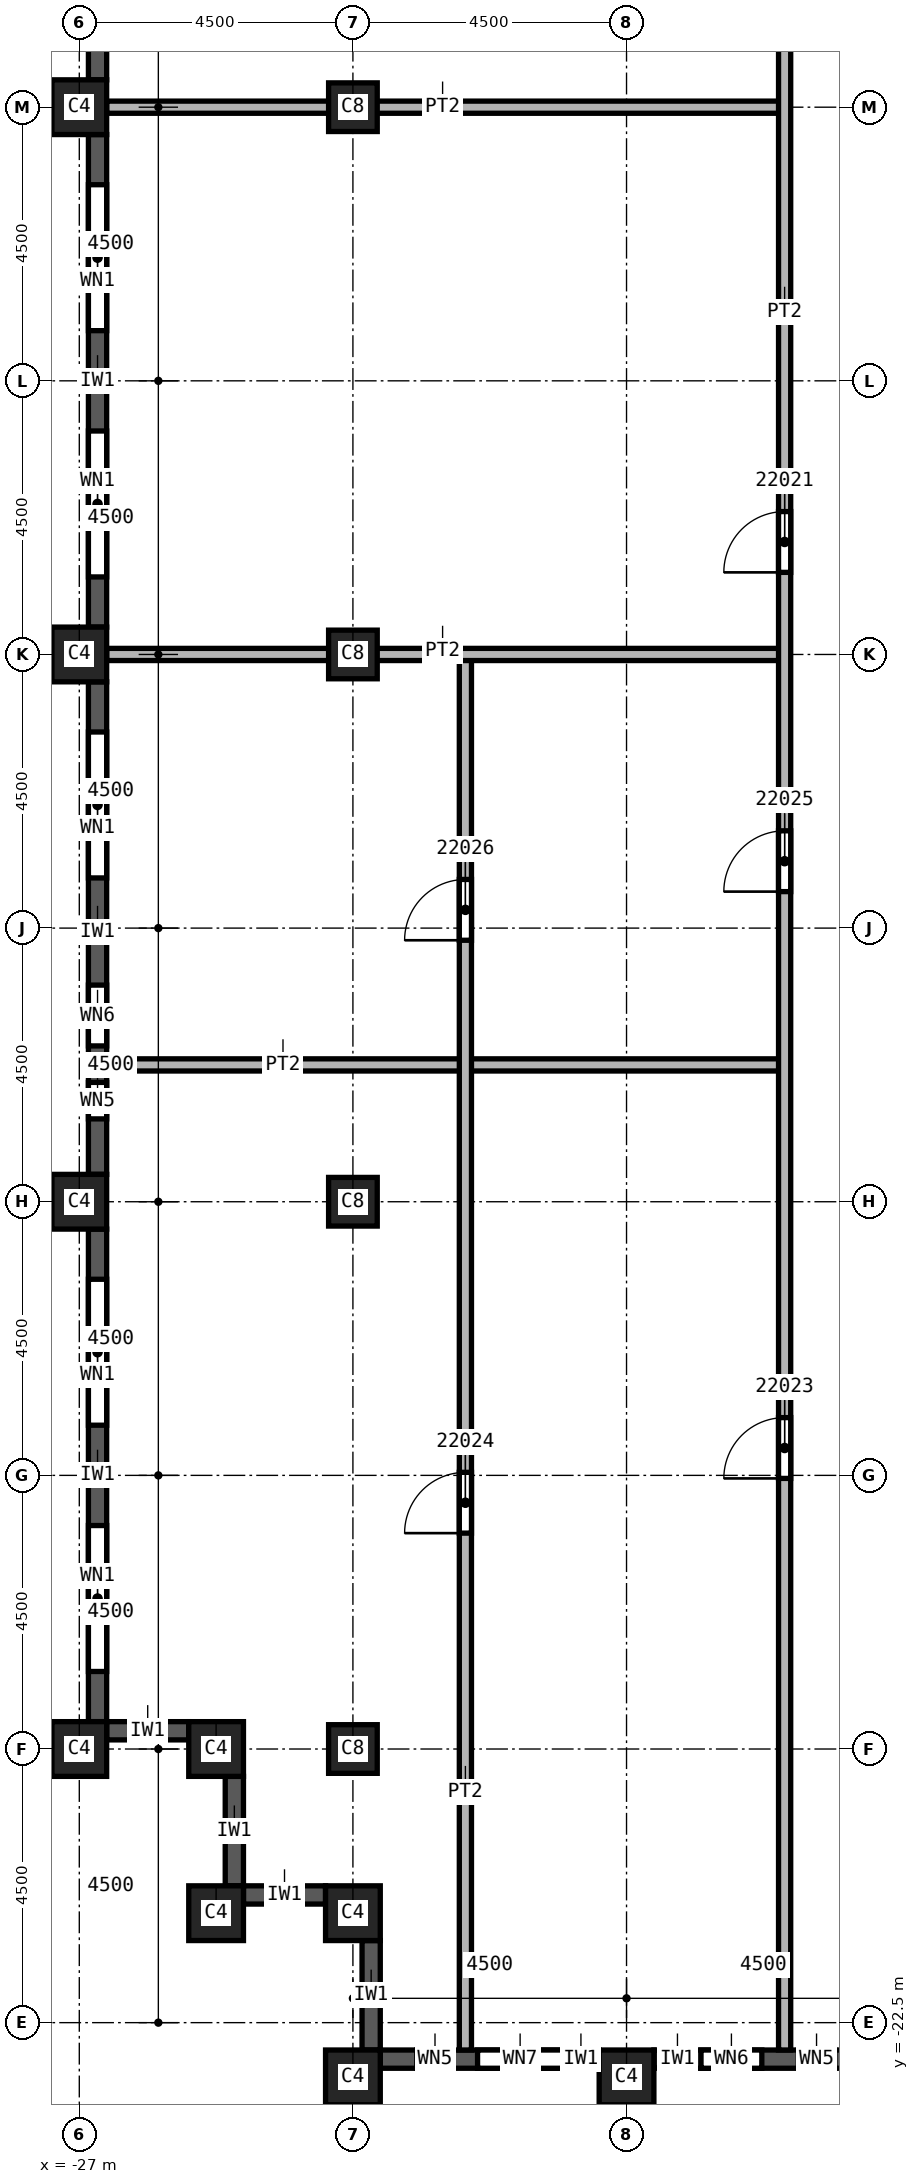
"""IFC4 building model, lengths in metres.
Left out: names, types, materials, properties, quantities, classifications, styles, units other than length and angle.
Written with IfcOpenShell. Run it as: python <this file> out.ifc"""

import sys

from ifc_helpers import new_model, si_unit, direction, frame, frame_2d, origin, origin_2d, place, context, subcontext, project, spatial, rectangle, extrude, element, fill, save


model = new_model("IFC4")
c1 = context("Model", 3, precision=1e-05, world=origin(), true_north=direction((0.0, 1.0)))
c2 = subcontext(c1, "Body", "Model", "MODEL_VIEW")
j1 = project(units=[si_unit("LENGTHUNIT", "METRE"), si_unit("PLANEANGLEUNIT", "RADIAN")], contexts=[c1])
p1 = place(None, origin())
s1 = spatial("IfcSite", under=j1, at=p1, CompositionType="ELEMENT")
p2 = place(p1, origin())
s2 = spatial("IfcBuilding", under=s1, at=p2, CompositionType="ELEMENT")
p3 = place(p2, frame((0.0, 0.0, 316.0)))
s3 = spatial("IfcBuildingStorey", under=s2, at=p3, CompositionType="ELEMENT", Elevation=316.0)
for number, where, z_axis, x_axis in (
    (1, (-22.5, 0.0, 0.0), (0.0, 0.0, 1.0), (1.0, 0.0, 0.0)),
    (2, (-22.5, 9.0, 0.0), (0.0, 0.0, 1.0), (1.0, 0.0, 0.0)),
    (3, (-22.5, -9.0, 0.0), (0.0, 0.0, 1.0), (1.0, 0.0, 0.0)),
    (4, (-22.5, -18.0, 0.0), (0.0, 0.0, 1.0), (1.0, 0.0, 0.0)),
):
    element("IfcColumn", number, at=place(p3, frame(where, z_axis=z_axis, x_axis=x_axis)), inside=s3, PredefinedType="COLUMN", context=c2, shape_type="SweptSolid", body=[
        extrude(rectangle(XDim=0.8, YDim=0.8, at=origin_2d()), origin(), (0.0, 0.0, 1.0), 3.59),
    ])
for number, where, z_axis, x_axis in (
    (5, (-18.0, -23.4, 0.0), (0.0, 0.0, 1.0), (1.0, 0.0, 0.0)),
    (6, (-22.5, -23.4, 0.0), (0.0, 0.0, 1.0), (1.0, 0.0, 0.0)),
    (7, (-27.0, 0.0, 0.0), (0.0, 0.0, 1.0), (0.0, 1.0, 0.0)),
    (8, (-27.0, 9.0, 0.0), (0.0, 0.0, 1.0), (0.0, 1.0, 0.0)),
    (9, (-27.0, -9.0, 0.0), (0.0, 0.0, 1.0), (0.0, 1.0, 0.0)),
    (10, (-27.0, -18.0, 0.0), (0.0, 0.0, 1.0), (0.0, 1.0, 0.0)),
    (11, (-22.5, -20.7, 0.0), (0.0, 0.0, 1.0), (1.0, 0.0, 0.0)),
    (12, (-24.75, -20.7, 0.0), (0.0, 0.0, 1.0), (1.0, 0.0, 0.0)),
    (13, (-24.75, -18.0, 0.0), (0.0, 0.0, 1.0), (1.0, 0.0, 0.0)),
):
    element("IfcColumn", number, at=place(p3, frame(where, z_axis=z_axis, x_axis=x_axis)), inside=s3, PredefinedType="COLUMN", context=c2, shape_type="SweptSolid", body=[
        extrude(rectangle(XDim=0.9, YDim=0.9, at=origin_2d()), origin(), (0.0, 0.0, 1.0), 3.59),
    ])
p4 = place(p3, frame((-26.7, 17.55, 0.0), z_axis=(0.0, 0.0, 1.0), x_axis=(0.0, -1.0, 0.0)))
e14 = element("IfcWall", 14, at=p4, inside=s3, PredefinedType="SOLIDWALL", context=c2, shape_type="SweptSolid", body=[
    extrude(rectangle(XDim=8.1, YDim=0.3, at=frame_2d((4.05, 0.0))), origin(), (0.0, 0.0, 1.0), 2.99),
])
p5 = place(p4, frame((0.825, 0.0, 0.8)))
e15 = element("IfcOpeningElement", 15, at=p5, cuts=e14, PredefinedType="OPENING", context=c2, shape_type="SweptSolid", body=[
    extrude(rectangle(XDim=2.4, YDim=1.95, at=frame_2d((1.2, 0.975))), frame((0.0, 0.15, 0.0), z_axis=(0.0, -1.0, 0.0), x_axis=(1.0, 0.0, 0.0)), (0.0, 0.0, 1.0), 0.3),
])
p6 = place(p4, frame((4.875, 0.0, 0.8)))
e16 = element("IfcOpeningElement", 16, at=p6, cuts=e14, PredefinedType="OPENING", context=c2, shape_type="SweptSolid", body=[
    extrude(rectangle(XDim=2.4, YDim=1.95, at=frame_2d((1.2, 0.975))), frame((0.0, 0.15, 0.0), z_axis=(0.0, -1.0, 0.0), x_axis=(1.0, 0.0, 0.0)), (0.0, 0.0, 1.0), 0.3),
])
p7 = place(p3, frame((-26.7, 8.55, 0.0), z_axis=(0.0, 0.0, 1.0), x_axis=(0.0, -1.0, 0.0)))
e17 = element("IfcWall", 17, at=p7, inside=s3, PredefinedType="SOLIDWALL", context=c2, shape_type="SweptSolid", body=[
    extrude(rectangle(XDim=8.1, YDim=0.3, at=frame_2d((4.05, 0.0))), origin(), (0.0, 0.0, 1.0), 2.99),
])
p8 = place(p7, frame((0.825, 0.0, 0.8)))
e18 = element("IfcOpeningElement", 18, at=p8, cuts=e17, PredefinedType="OPENING", context=c2, shape_type="SweptSolid", body=[
    extrude(rectangle(XDim=2.4, YDim=1.95, at=frame_2d((1.2, 0.975))), frame((0.0, 0.15, 0.0), z_axis=(0.0, -1.0, 0.0), x_axis=(1.0, 0.0, 0.0)), (0.0, 0.0, 1.0), 0.3),
])
p9 = place(p7, frame((4.875, 0.0, 0.8)))
e19 = element("IfcOpeningElement", 19, at=p9, cuts=e17, PredefinedType="OPENING", context=c2, shape_type="SweptSolid", body=[
    extrude(rectangle(XDim=2.4, YDim=1.95, at=frame_2d((1.2, 0.975))), frame((0.0, 0.15, 0.0), z_axis=(0.0, -1.0, 0.0), x_axis=(1.0, 0.0, 0.0)), (0.0, 0.0, 1.0), 0.3),
])
p10 = place(p3, frame((-26.7, -0.45, 0.0), z_axis=(0.0, 0.0, 1.0), x_axis=(0.0, -1.0, 0.0)))
e20 = element("IfcWall", 20, at=p10, inside=s3, PredefinedType="SOLIDWALL", context=c2, shape_type="SweptSolid", body=[
    extrude(rectangle(XDim=8.1, YDim=0.3, at=frame_2d((4.05, 0.0))), origin(), (0.0, 0.0, 1.0), 2.99),
])
p11 = place(p10, frame((0.825, 0.0, 0.8)))
e21 = element("IfcOpeningElement", 21, at=p11, cuts=e20, PredefinedType="OPENING", context=c2, shape_type="SweptSolid", body=[
    extrude(rectangle(XDim=2.4, YDim=1.95, at=frame_2d((1.2, 0.975))), frame((0.0, 0.15, 0.0), z_axis=(0.0, -1.0, 0.0), x_axis=(1.0, 0.0, 0.0)), (0.0, 0.0, 1.0), 0.3),
])
p12 = place(p10, frame((4.988, 0.0, 0.8)))
e22 = element("IfcOpeningElement", 22, at=p12, cuts=e20, PredefinedType="OPENING", context=c2, shape_type="SweptSolid", body=[
    extrude(rectangle(XDim=1.0, YDim=1.95, at=frame_2d((0.5, 0.975))), frame((0.0, 0.15, 0.0), z_axis=(0.0, -1.0, 0.0), x_axis=(1.0, 0.0, 0.0)), (0.0, 0.0, 1.0), 0.3),
])
p13 = place(p10, frame((6.587, 0.0, 0.8)))
e23 = element("IfcOpeningElement", 23, at=p13, cuts=e20, PredefinedType="OPENING", context=c2, shape_type="SweptSolid", body=[
    extrude(rectangle(XDim=0.6, YDim=1.95, at=frame_2d((0.3, 0.975))), frame((0.0, 0.15, 0.0), z_axis=(0.0, -1.0, 0.0), x_axis=(1.0, 0.0, 0.0)), (0.0, 0.0, 1.0), 0.3),
])
p14 = place(p3, frame((-26.7, -9.45, 0.0), z_axis=(0.0, 0.0, 1.0), x_axis=(0.0, -1.0, 0.0)))
e24 = element("IfcWall", 24, at=p14, inside=s3, PredefinedType="SOLIDWALL", context=c2, shape_type="SweptSolid", body=[
    extrude(rectangle(XDim=8.1, YDim=0.3, at=frame_2d((4.05, 0.0))), origin(), (0.0, 0.0, 1.0), 2.99),
])
p15 = place(p14, frame((0.825, 0.0, 0.8)))
e25 = element("IfcOpeningElement", 25, at=p15, cuts=e24, PredefinedType="OPENING", context=c2, shape_type="SweptSolid", body=[
    extrude(rectangle(XDim=2.4, YDim=1.95, at=frame_2d((1.2, 0.975))), frame((0.0, 0.15, 0.0), z_axis=(0.0, -1.0, 0.0), x_axis=(1.0, 0.0, 0.0)), (0.0, 0.0, 1.0), 0.3),
])
p16 = place(p14, frame((4.875, 0.0, 0.8)))
e26 = element("IfcOpeningElement", 26, at=p16, cuts=e24, PredefinedType="OPENING", context=c2, shape_type="SweptSolid", body=[
    extrude(rectangle(XDim=2.4, YDim=1.95, at=frame_2d((1.2, 0.975))), frame((0.0, 0.15, 0.0), z_axis=(0.0, -1.0, 0.0), x_axis=(1.0, 0.0, 0.0)), (0.0, 0.0, 1.0), 0.3),
])
p17 = place(p3, frame((-26.55, -17.7, 0.0), z_axis=(0.0, 0.0, 1.0), x_axis=(1.0, 0.0, 0.0)))
e27 = element("IfcWall", 27, at=p17, inside=s3, PredefinedType="SOLIDWALL", context=c2, shape_type="SweptSolid", body=[
    extrude(rectangle(XDim=1.35, YDim=0.3, at=frame_2d((0.675, 0.0))), origin(), (0.0, 0.0, 1.0), 2.99),
])
p18 = place(p3, frame((-24.45, -18.45, 0.0), z_axis=(0.0, 0.0, 1.0), x_axis=(0.0, -1.0, 0.0)))
e28 = element("IfcWall", 28, at=p18, inside=s3, PredefinedType="SOLIDWALL", context=c2, shape_type="SweptSolid", body=[
    extrude(rectangle(XDim=1.8, YDim=0.3, at=frame_2d((0.9, 0.0))), origin(), (0.0, 0.0, 1.0), 2.99),
])
p19 = place(p3, frame((-24.3, -20.4, 0.0), z_axis=(0.0, 0.0, 1.0), x_axis=(1.0, 0.0, 0.0)))
e29 = element("IfcWall", 29, at=p19, inside=s3, PredefinedType="SOLIDWALL", context=c2, shape_type="SweptSolid", body=[
    extrude(rectangle(XDim=1.35, YDim=0.3, at=frame_2d((0.675, 0.0))), origin(), (0.0, 0.0, 1.0), 2.99),
])
p20 = place(p3, frame((-22.2, -21.15, 0.0), z_axis=(0.0, 0.0, 1.0), x_axis=(0.0, -1.0, 0.0)))
e30 = element("IfcWall", 30, at=p20, inside=s3, PredefinedType="SOLIDWALL", context=c2, shape_type="SweptSolid", body=[
    extrude(rectangle(XDim=1.8, YDim=0.3, at=frame_2d((0.9, 0.0))), origin(), (0.0, 0.0, 1.0), 2.99),
])
p21 = place(p3, frame((-22.05, -23.1, 0.0), z_axis=(0.0, 0.0, 1.0), x_axis=(1.0, 0.0, 0.0)))
e31 = element("IfcWall", 31, at=p21, inside=s3, PredefinedType="SOLIDWALL", context=c2, shape_type="SweptSolid", body=[
    extrude(rectangle(XDim=3.6, YDim=0.3, at=frame_2d((1.8, 0.0))), origin(), (0.0, 0.0, 1.0), 2.99),
])
p22 = place(p21, frame((0.6, 0.0, 0.8)))
e32 = element("IfcOpeningElement", 32, at=p22, cuts=e31, PredefinedType="OPENING", context=c2, shape_type="SweptSolid", body=[
    extrude(rectangle(XDim=0.6, YDim=1.95, at=frame_2d((0.3, 0.975))), frame((0.0, 0.15, 0.0), z_axis=(0.0, -1.0, 0.0), x_axis=(1.0, 0.0, 0.0)), (0.0, 0.0, 1.0), 0.3),
])
p23 = place(p21, frame((1.6, 0.0, 0.8)))
e33 = element("IfcOpeningElement", 33, at=p23, cuts=e31, PredefinedType="OPENING", context=c2, shape_type="SweptSolid", body=[
    extrude(rectangle(XDim=1.4, YDim=1.95, at=frame_2d((0.7, 0.975))), frame((0.0, 0.15, 0.0), z_axis=(0.0, -1.0, 0.0), x_axis=(1.0, 0.0, 0.0)), (0.0, 0.0, 1.0), 0.3),
])
p24 = place(p3, frame((-17.55, -23.1, 0.0), z_axis=(0.0, 0.0, 1.0), x_axis=(1.0, 0.0, 0.0)))
e34 = element("IfcWall", 34, at=p24, inside=s3, PredefinedType="SOLIDWALL", context=c2, shape_type="SweptSolid", body=[
    extrude(rectangle(XDim=3.6, YDim=0.3, at=frame_2d((1.8, 0.0))), origin(), (0.0, 0.0, 1.0), 2.99),
])
p25 = place(p24, frame((0.775, 0.0, 0.8)))
e35 = element("IfcOpeningElement", 35, at=p25, cuts=e34, PredefinedType="OPENING", context=c2, shape_type="SweptSolid", body=[
    extrude(rectangle(XDim=1.0, YDim=1.95, at=frame_2d((0.5, 0.975))), frame((0.0, 0.15, 0.0), z_axis=(0.0, -1.0, 0.0), x_axis=(1.0, 0.0, 0.0)), (0.0, 0.0, 1.0), 0.3),
])
p26 = place(p24, frame((2.375, 0.0, 0.8)))
e36 = element("IfcOpeningElement", 36, at=p26, cuts=e34, PredefinedType="OPENING", context=c2, shape_type="SweptSolid", body=[
    extrude(rectangle(XDim=0.6, YDim=1.95, at=frame_2d((0.3, 0.975))), frame((0.0, 0.15, 0.0), z_axis=(0.0, -1.0, 0.0), x_axis=(1.0, 0.0, 0.0)), (0.0, 0.0, 1.0), 0.3),
])
for number, where, z_axis, x_axis in (
    (37, (-26.55, -6.75, 0.0), (0.0, 0.0, 1.0), (1.0, 0.0, 0.0)),
    (38, (-26.55, 9.0, 0.0), (0.0, 0.0, 1.0), (1.0, 0.0, 0.0)),
):
    element("IfcWall", number, at=place(p3, frame(where, z_axis=z_axis, x_axis=x_axis)), inside=s3, PredefinedType="PARTITIONING", context=c2, shape_type="SweptSolid", body=[
        extrude(rectangle(XDim=11.15, YDim=0.2, at=frame_2d((5.575, 0.0))), origin(), (0.0, 0.0, 1.0), 3.59),
    ])
p27 = place(p3, frame((-20.65, -22.95, 0.0), z_axis=(0.0, 0.0, 1.0), x_axis=(0.0, 1.0, 0.0)))
e39 = element("IfcWall", 39, at=p27, inside=s3, PredefinedType="PARTITIONING", context=c2, shape_type="SweptSolid", body=[
    extrude(rectangle(XDim=22.95, YDim=0.2, at=frame_2d((11.475, 0.0))), origin(), (0.0, 0.0, 1.0), 3.59),
])
p28 = place(p27, frame((8.5, 0.0, 0.0)))
e40 = element("IfcOpeningElement", 40, at=p28, cuts=e39, PredefinedType="OPENING", context=c2, shape_type="SweptSolid", body=[
    extrude(rectangle(XDim=1.0, YDim=2.1, at=frame_2d((0.5, 1.05))), frame((0.0, 0.1, 0.0), z_axis=(0.0, -1.0, 0.0), x_axis=(1.0, 0.0, 0.0)), (0.0, 0.0, 1.0), 0.2),
])
p29 = place(p27, frame((18.25, 0.0, 0.0)))
e41 = element("IfcOpeningElement", 41, at=p29, cuts=e39, PredefinedType="OPENING", context=c2, shape_type="SweptSolid", body=[
    extrude(rectangle(XDim=1.0, YDim=2.1, at=frame_2d((0.5, 1.05))), frame((0.0, 0.1, 0.0), z_axis=(0.0, -1.0, 0.0), x_axis=(1.0, 0.0, 0.0)), (0.0, 0.0, 1.0), 0.2),
])
p30 = place(p3, frame((-15.4, 0.0, 0.0), z_axis=(0.0, 0.0, 1.0), x_axis=(-1.0, 0.0, 0.0)))
e42 = element("IfcWall", 42, at=p30, inside=s3, PredefinedType="PARTITIONING", context=c2, shape_type="SweptSolid", body=[
    extrude(rectangle(XDim=11.15, YDim=0.2, at=frame_2d((5.575, 0.0))), origin(), (0.0, 0.0, 1.0), 3.59),
])
p31 = place(p3, frame((-15.4, -22.95, 0.0), z_axis=(0.0, 0.0, 1.0), x_axis=(0.0, 1.0, 0.0)))
e43 = element("IfcWall", 43, at=p31, inside=s3, PredefinedType="PARTITIONING", context=c2, shape_type="SweptSolid", body=[
    extrude(rectangle(XDim=36.55, YDim=0.2, at=frame_2d((18.275, 0.0))), origin(), (0.0, 0.0, 1.0), 3.59),
])
p32 = place(p31, frame((24.3, 0.0, 0.0)))
e44 = element("IfcOpeningElement", 44, at=p32, cuts=e43, PredefinedType="OPENING", context=c2, shape_type="SweptSolid", body=[
    extrude(rectangle(XDim=1.0, YDim=2.1, at=frame_2d((0.5, 1.05))), frame((0.0, 0.1, 0.0), z_axis=(0.0, -1.0, 0.0), x_axis=(1.0, 0.0, 0.0)), (0.0, 0.0, 1.0), 0.2),
])
p33 = place(p31, frame((9.4, 0.0, 0.0)))
e45 = element("IfcOpeningElement", 45, at=p33, cuts=e43, PredefinedType="OPENING", context=c2, shape_type="SweptSolid", body=[
    extrude(rectangle(XDim=1.0, YDim=2.1, at=frame_2d((0.5, 1.05))), frame((0.0, 0.1, 0.0), z_axis=(0.0, -1.0, 0.0), x_axis=(1.0, 0.0, 0.0)), (0.0, 0.0, 1.0), 0.2),
])
p34 = place(p31, frame((19.05, 0.0, 0.0)))
e46 = element("IfcOpeningElement", 46, at=p34, cuts=e43, PredefinedType="OPENING", context=c2, shape_type="SweptSolid", body=[
    extrude(rectangle(XDim=1.0, YDim=2.1, at=frame_2d((0.5, 1.05))), frame((0.0, 0.1, 0.0), z_axis=(0.0, -1.0, 0.0), x_axis=(1.0, 0.0, 0.0)), (0.0, 0.0, 1.0), 0.2),
])
p35 = place(p8, origin())
e47 = element("IfcWindow", 47, at=p35, inside=s3, PartitioningType="SINGLE_PANEL", PredefinedType="WINDOW", context=c2, shape_type="SweptSolid", body=[
    extrude(rectangle(XDim=2.4, YDim=1.95, at=frame_2d((1.2, 0.975))), frame((0.0, 0.03, 0.0), z_axis=(0.0, -1.0, 0.0), x_axis=(1.0, 0.0, 0.0)), (0.0, 0.0, 1.0), 0.06),
])
fill(e18, e47)
p36 = place(p9, origin())
e48 = element("IfcWindow", 48, at=p36, inside=s3, PartitioningType="SINGLE_PANEL", PredefinedType="WINDOW", context=c2, shape_type="SweptSolid", body=[
    extrude(rectangle(XDim=2.4, YDim=1.95, at=frame_2d((1.2, 0.975))), frame((0.0, 0.03, 0.0), z_axis=(0.0, -1.0, 0.0), x_axis=(1.0, 0.0, 0.0)), (0.0, 0.0, 1.0), 0.06),
])
fill(e19, e48)
p37 = place(p11, origin())
e49 = element("IfcWindow", 49, at=p37, inside=s3, PartitioningType="SINGLE_PANEL", PredefinedType="WINDOW", context=c2, shape_type="SweptSolid", body=[
    extrude(rectangle(XDim=2.4, YDim=1.95, at=frame_2d((1.2, 0.975))), frame((0.0, 0.03, 0.0), z_axis=(0.0, -1.0, 0.0), x_axis=(1.0, 0.0, 0.0)), (0.0, 0.0, 1.0), 0.06),
])
fill(e21, e49)
p38 = place(p15, origin())
e50 = element("IfcWindow", 50, at=p38, inside=s3, PartitioningType="SINGLE_PANEL", PredefinedType="WINDOW", context=c2, shape_type="SweptSolid", body=[
    extrude(rectangle(XDim=2.4, YDim=1.95, at=frame_2d((1.2, 0.975))), frame((0.0, 0.03, 0.0), z_axis=(0.0, -1.0, 0.0), x_axis=(1.0, 0.0, 0.0)), (0.0, 0.0, 1.0), 0.06),
])
fill(e25, e50)
p39 = place(p16, origin())
e51 = element("IfcWindow", 51, at=p39, inside=s3, PartitioningType="SINGLE_PANEL", PredefinedType="WINDOW", context=c2, shape_type="SweptSolid", body=[
    extrude(rectangle(XDim=2.4, YDim=1.95, at=frame_2d((1.2, 0.975))), frame((0.0, 0.03, 0.0), z_axis=(0.0, -1.0, 0.0), x_axis=(1.0, 0.0, 0.0)), (0.0, 0.0, 1.0), 0.06),
])
fill(e26, e51)
p40 = place(p32, origin())
e52 = element("IfcDoor", 52, at=p40, inside=s3, OperationType="SINGLE_SWING_RIGHT", PredefinedType="DOOR", context=c2, shape_type="SweptSolid", body=[
    extrude(rectangle(XDim=1.0, YDim=2.1, at=frame_2d((0.5, 1.05))), frame((0.0, 0.025, 0.0), z_axis=(0.0, -1.0, 0.0), x_axis=(1.0, 0.0, 0.0)), (0.0, 0.0, 1.0), 0.05),
])
fill(e44, e52)
p41 = place(p33, origin())
e53 = element("IfcDoor", 53, at=p41, inside=s3, OperationType="SINGLE_SWING_RIGHT", PredefinedType="DOOR", context=c2, shape_type="SweptSolid", body=[
    extrude(rectangle(XDim=1.0, YDim=2.1, at=frame_2d((0.5, 1.05))), frame((0.0, 0.025, 0.0), z_axis=(0.0, -1.0, 0.0), x_axis=(1.0, 0.0, 0.0)), (0.0, 0.0, 1.0), 0.05),
])
fill(e45, e53)
p42 = place(p28, origin())
e54 = element("IfcDoor", 54, at=p42, inside=s3, OperationType="SINGLE_SWING_LEFT", PredefinedType="DOOR", context=c2, shape_type="SweptSolid", body=[
    extrude(rectangle(XDim=1.0, YDim=2.1, at=frame_2d((0.5, 1.05))), frame((0.0, 0.025, 0.0), z_axis=(0.0, -1.0, 0.0), x_axis=(1.0, 0.0, 0.0)), (0.0, 0.0, 1.0), 0.05),
])
fill(e40, e54)
p43 = place(p34, origin())
e55 = element("IfcDoor", 55, at=p43, inside=s3, OperationType="SINGLE_SWING_RIGHT", PredefinedType="DOOR", context=c2, shape_type="SweptSolid", body=[
    extrude(rectangle(XDim=1.0, YDim=2.1, at=frame_2d((0.5, 1.05))), frame((0.0, 0.025, 0.0), z_axis=(0.0, -1.0, 0.0), x_axis=(1.0, 0.0, 0.0)), (0.0, 0.0, 1.0), 0.05),
])
fill(e46, e55)
p44 = place(p29, origin())
e56 = element("IfcDoor", 56, at=p44, inside=s3, OperationType="SINGLE_SWING_LEFT", PredefinedType="DOOR", context=c2, shape_type="SweptSolid", body=[
    extrude(rectangle(XDim=1.0, YDim=2.1, at=frame_2d((0.5, 1.05))), frame((0.0, 0.025, 0.0), z_axis=(0.0, -1.0, 0.0), x_axis=(1.0, 0.0, 0.0)), (0.0, 0.0, 1.0), 0.05),
])
fill(e41, e56)
p45 = place(p12, origin())
e57 = element("IfcWindow", 57, at=p45, inside=s3, PartitioningType="SINGLE_PANEL", PredefinedType="WINDOW", context=c2, shape_type="SweptSolid", body=[
    extrude(rectangle(XDim=1.0, YDim=1.95, at=frame_2d((0.5, 0.975))), frame((0.0, 0.03, 0.0), z_axis=(0.0, -1.0, 0.0), x_axis=(1.0, 0.0, 0.0)), (0.0, 0.0, 1.0), 0.06),
])
fill(e22, e57)
p46 = place(p13, origin())
e58 = element("IfcWindow", 58, at=p46, inside=s3, PartitioningType="SINGLE_PANEL", PredefinedType="WINDOW", context=c2, shape_type="SweptSolid", body=[
    extrude(rectangle(XDim=0.6, YDim=1.95, at=frame_2d((0.3, 0.975))), frame((0.0, 0.03, 0.0), z_axis=(0.0, -1.0, 0.0), x_axis=(1.0, 0.0, 0.0)), (0.0, 0.0, 1.0), 0.06),
])
fill(e23, e58)
p47 = place(p22, origin())
e59 = element("IfcWindow", 59, at=p47, inside=s3, PartitioningType="SINGLE_PANEL", PredefinedType="WINDOW", context=c2, shape_type="SweptSolid", body=[
    extrude(rectangle(XDim=0.6, YDim=1.95, at=frame_2d((0.3, 0.975))), frame((0.0, 0.03, 0.0), z_axis=(0.0, -1.0, 0.0), x_axis=(1.0, 0.0, 0.0)), (0.0, 0.0, 1.0), 0.06),
])
fill(e32, e59)
p48 = place(p23, origin())
e60 = element("IfcWindow", 60, at=p48, inside=s3, PartitioningType="SINGLE_PANEL", PredefinedType="WINDOW", context=c2, shape_type="SweptSolid", body=[
    extrude(rectangle(XDim=1.4, YDim=1.95, at=frame_2d((0.7, 0.975))), frame((0.0, 0.03, 0.0), z_axis=(0.0, -1.0, 0.0), x_axis=(1.0, 0.0, 0.0)), (0.0, 0.0, 1.0), 0.06),
])
fill(e33, e60)
p49 = place(p25, origin())
e61 = element("IfcWindow", 61, at=p49, inside=s3, PartitioningType="SINGLE_PANEL", PredefinedType="WINDOW", context=c2, shape_type="SweptSolid", body=[
    extrude(rectangle(XDim=1.0, YDim=1.95, at=frame_2d((0.5, 0.975))), frame((0.0, 0.03, 0.0), z_axis=(0.0, -1.0, 0.0), x_axis=(1.0, 0.0, 0.0)), (0.0, 0.0, 1.0), 0.06),
])
fill(e35, e61)
p50 = place(p26, origin())
e62 = element("IfcWindow", 62, at=p50, inside=s3, PartitioningType="SINGLE_PANEL", PredefinedType="WINDOW", context=c2, shape_type="SweptSolid", body=[
    extrude(rectangle(XDim=0.6, YDim=1.95, at=frame_2d((0.3, 0.975))), frame((0.0, 0.03, 0.0), z_axis=(0.0, -1.0, 0.0), x_axis=(1.0, 0.0, 0.0)), (0.0, 0.0, 1.0), 0.06),
])
fill(e36, e62)
save(model, sys.argv[1])
